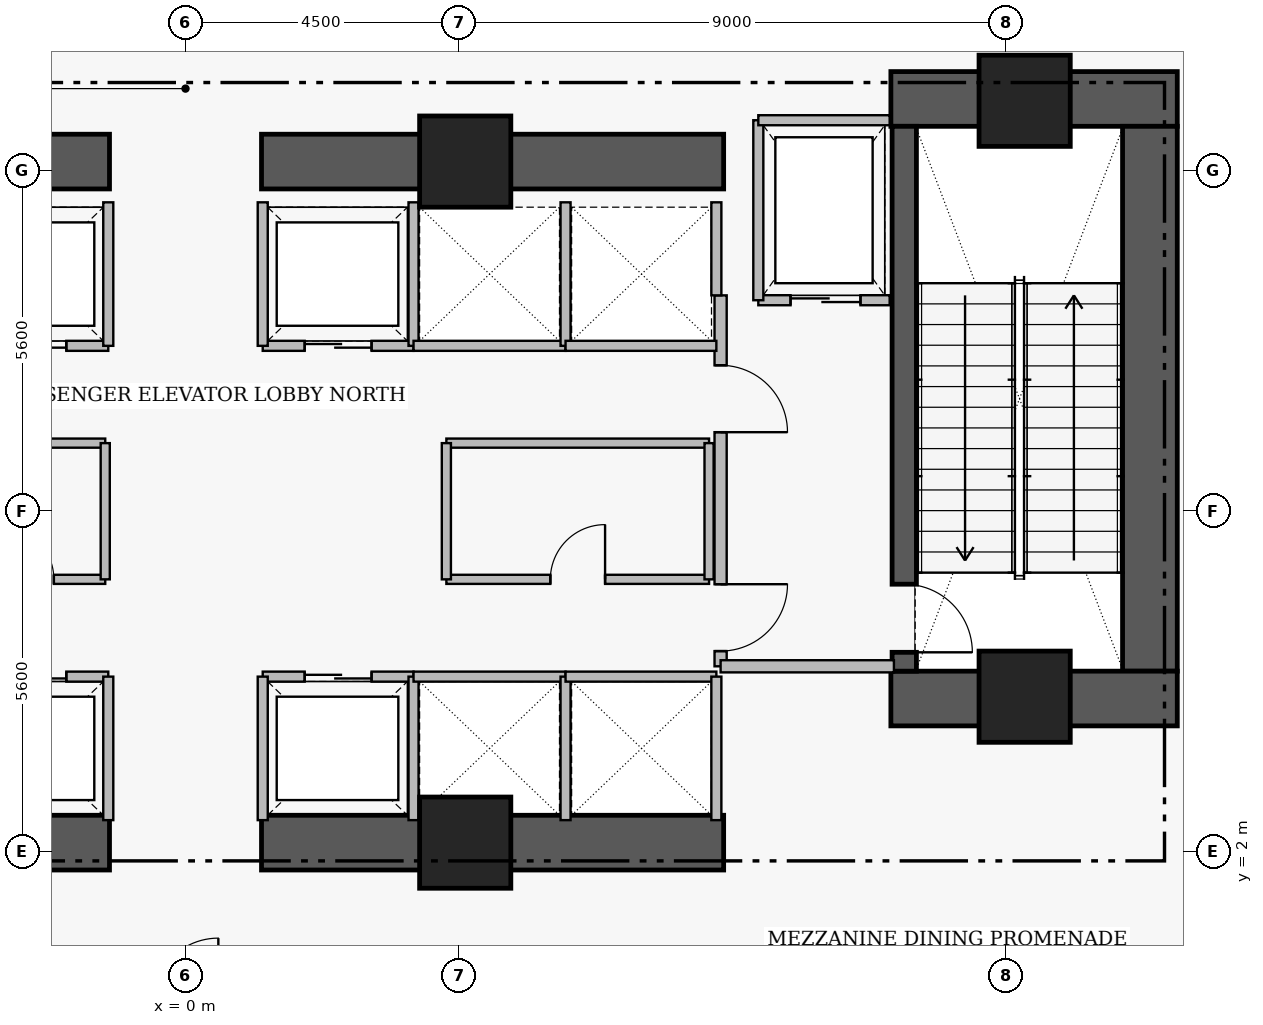
"""IFC4 building model, lengths in metres.
Left out: names, types, materials, properties, quantities, classifications, styles, units other than length and angle.
Written with IfcOpenShell. Run it as: python <this file> out.ifc"""

import sys

from ifc_helpers import new_model, si_unit, direction, frame, frame_2d, origin, origin_2d, place, context, subcontext, project, spatial, rectangle, extrude, element, fill, save


model = new_model("IFC4")
c1 = context("Model", 3, precision=1e-05, world=origin(), true_north=direction((0.0, 1.0)))
c2 = subcontext(c1, "Body", "Model", "MODEL_VIEW")
j1 = project(units=[si_unit("LENGTHUNIT", "METRE"), si_unit("PLANEANGLEUNIT", "RADIAN")], contexts=[c1])
p1 = place(None, origin())
s1 = spatial("IfcSite", under=j1, at=p1, CompositionType="ELEMENT")
p2 = place(p1, origin())
s2 = spatial("IfcBuilding", under=s1, at=p2, CompositionType="ELEMENT")
p3 = place(p2, frame((0.0, 0.0, 6.0)))
s3 = spatial("IfcBuildingStorey", under=s2, at=p3, CompositionType="ELEMENT", Elevation=6.0)
p4 = place(p3, frame((11.6, 14.38, 0.0), z_axis=(0.0, 0.0, 1.0), x_axis=(1.0, 0.0, 0.0)))
e1 = element("IfcWall", 1, at=p4, inside=s3, PredefinedType="SHEAR", context=c2, shape_type="SweptSolid", body=[
    extrude(rectangle(XDim=4.71, YDim=0.9, at=frame_2d((2.355, 0.0))), origin(), (0.0, 0.0, 1.0), 5.21),
])
p5 = place(p3, frame((15.86, 4.97, 0.0), z_axis=(0.0, 0.0, 1.0), x_axis=(0.0, 1.0, 0.0)))
e2 = element("IfcWall", 2, at=p5, inside=s3, PredefinedType="SHEAR", context=c2, shape_type="SweptSolid", body=[
    extrude(rectangle(XDim=8.96, YDim=0.9, at=frame_2d((4.48, 0.0))), origin(), (0.0, 0.0, 1.0), 5.21),
])
p6 = place(p3, frame((11.6, 4.52, 0.0), z_axis=(0.0, 0.0, 1.0), x_axis=(1.0, 0.0, 0.0)))
e3 = element("IfcWall", 3, at=p6, inside=s3, PredefinedType="SHEAR", context=c2, shape_type="SweptSolid", body=[
    extrude(rectangle(XDim=4.71, YDim=0.9, at=frame_2d((2.355, 0.0))), origin(), (0.0, 0.0, 1.0), 5.21),
])
for number, where, z_axis, x_axis in (
    (4, (-8.85, 2.15, 0.0), (0.0, 0.0, 1.0), (1.0, 0.0, 0.0)),
    (5, (1.25, 2.15, 0.0), (0.0, 0.0, 1.0), (1.0, 0.0, 0.0)),
    (6, (-8.85, 13.35, 0.0), (0.0, 0.0, 1.0), (1.0, 0.0, 0.0)),
    (7, (1.25, 13.35, 0.0), (0.0, 0.0, 1.0), (1.0, 0.0, 0.0)),
):
    element("IfcWall", number, at=place(p3, frame(where, z_axis=z_axis, x_axis=x_axis)), inside=s3, PredefinedType="SHEAR", context=c2, shape_type="SweptSolid", body=[
        extrude(rectangle(XDim=7.6, YDim=0.9, at=frame_2d((3.8, 0.0))), origin(), (0.0, 0.0, 1.0), 5.14),
    ])
p7 = place(p3, frame((11.82, 13.93, 0.0), z_axis=(0.0, 0.0, 1.0), x_axis=(0.0, -1.0, 0.0)))
e8 = element("IfcWall", 8, at=p7, inside=s3, PredefinedType="SHEAR", context=c2, shape_type="SweptSolid", body=[
    extrude(rectangle(XDim=8.96, YDim=0.4, at=frame_2d((4.48, 0.0))), origin(), (0.0, 0.0, 1.0), 5.21),
])
p8 = place(p7, frame((7.53, 0.0, 0.0)))
e9 = element("IfcOpeningElement", 9, at=p8, cuts=e8, PredefinedType="OPENING", context=c2, shape_type="SweptSolid", body=[
    extrude(rectangle(XDim=1.12, YDim=2.22, at=frame_2d((0.56, 1.11))), frame((0.0, 0.21, 0.0), z_axis=(0.0, -1.0, 0.0), x_axis=(1.0, 0.0, 0.0)), (0.0, 0.0, 1.0), 0.42),
])
for number, where, z_axis, x_axis in (
    (10, (4.6, 13.35, 0.0), (0.0, 0.0, 1.0), (1.0, 0.0, 0.0)),
    (11, (13.8, 14.35, 0.0), (0.0, 0.0, 1.0), (1.0, 0.0, 0.0)),
    (12, (4.6, 2.15, 0.0), (0.0, 0.0, 1.0), (1.0, 0.0, 0.0)),
    (13, (13.8, 4.55, 0.0), (0.0, 0.0, 1.0), (1.0, 0.0, 0.0)),
):
    element("IfcColumn", number, at=place(p3, frame(where, z_axis=z_axis, x_axis=x_axis)), inside=s3, PredefinedType="COLUMN", context=c2, shape_type="SweptSolid", body=[
        extrude(rectangle(XDim=1.5, YDim=1.5, at=origin_2d()), origin(), (0.0, 0.0, 1.0), 5.4),
    ])
p9 = place(p3, frame((8.8, 11.15, 0.0), z_axis=(0.0, 0.0, 1.0), x_axis=(0.0, -1.0, 0.0)))
e14 = element("IfcWall", 14, at=p9, inside=s3, PredefinedType="PARTITIONING", context=c2, shape_type="SweptSolid", body=[
    extrude(rectangle(XDim=6.1, YDim=0.2, at=frame_2d((3.05, 0.0))), origin(), (0.0, 0.0, 1.0), 5.14),
])
p10 = place(p9, frame((1.15, 0.0, 0.0)))
e15 = element("IfcOpeningElement", 15, at=p10, cuts=e14, PredefinedType="OPENING", context=c2, shape_type="SweptSolid", body=[
    extrude(rectangle(XDim=1.1, YDim=2.2, at=frame_2d((0.55, 1.1))), frame((0.0, 0.11, 0.0), z_axis=(0.0, -1.0, 0.0), x_axis=(1.0, 0.0, 0.0)), (0.0, 0.0, 1.0), 0.22),
])
p11 = place(p9, frame((4.75, 0.0, 0.0)))
e16 = element("IfcOpeningElement", 16, at=p11, cuts=e14, PredefinedType="OPENING", context=c2, shape_type="SweptSolid", body=[
    extrude(rectangle(XDim=1.1, YDim=2.2, at=frame_2d((0.55, 1.1))), frame((0.0, 0.11, 0.0), z_axis=(0.0, -1.0, 0.0), x_axis=(1.0, 0.0, 0.0)), (0.0, 0.0, 1.0), 0.22),
])
p12 = place(p3, frame((9.42, 11.07, 0.0), z_axis=(0.0, 0.0, 1.0), x_axis=(1.0, 0.0, 0.0)))
e17 = element("IfcWall", 17, at=p12, inside=s3, PredefinedType="PARTITIONING", context=c2, shape_type="SweptSolid", body=[
    extrude(rectangle(XDim=2.16, YDim=0.165, at=frame_2d((1.08, 0.0))), origin(), (0.0, 0.0, 1.0), 5.14),
])
p13 = place(p12, frame((0.53, 0.0, 0.0)))
e18 = element("IfcOpeningElement", 18, at=p13, cuts=e17, PredefinedType="OPENING", context=c2, shape_type="SweptSolid", body=[
    extrude(rectangle(XDim=1.15, YDim=2.25, at=frame_2d((0.575, 1.125))), frame((0.0, 0.093, 0.0), z_axis=(0.0, -1.0, 0.0), x_axis=(1.0, 0.0, 0.0)), (0.0, 0.0, 1.0), 0.185),
])
p14 = place(p3, frame((-3.75, 4.88, 0.0), z_axis=(0.0, 0.0, 1.0), x_axis=(1.0, 0.0, 0.0)))
e19 = element("IfcWall", 19, at=p14, inside=s3, PredefinedType="PARTITIONING", context=c2, shape_type="SweptSolid", body=[
    extrude(rectangle(XDim=2.48, YDim=0.165, at=frame_2d((1.24, 0.0))), origin(), (0.0, 0.0, 1.0), 5.14),
])
p15 = place(p14, frame((0.69, 0.0, 0.0)))
e20 = element("IfcOpeningElement", 20, at=p15, cuts=e19, PredefinedType="OPENING", context=c2, shape_type="SweptSolid", body=[
    extrude(rectangle(XDim=1.1, YDim=2.25, at=frame_2d((0.55, 1.125))), frame((0.0, 0.093, 0.0), z_axis=(0.0, -1.0, 0.0), x_axis=(1.0, 0.0, 0.0)), (0.0, 0.0, 1.0), 0.185),
])
p16 = place(p3, frame((1.27, 4.88, 0.0), z_axis=(0.0, 0.0, 1.0), x_axis=(1.0, 0.0, 0.0)))
e21 = element("IfcWall", 21, at=p16, inside=s3, PredefinedType="PARTITIONING", context=c2, shape_type="SweptSolid", body=[
    extrude(rectangle(XDim=2.48, YDim=0.165, at=frame_2d((1.24, 0.0))), origin(), (0.0, 0.0, 1.0), 5.14),
])
p17 = place(p16, frame((0.69, 0.0, 0.0)))
e22 = element("IfcOpeningElement", 22, at=p17, cuts=e21, PredefinedType="OPENING", context=c2, shape_type="SweptSolid", body=[
    extrude(rectangle(XDim=1.1, YDim=2.25, at=frame_2d((0.55, 1.125))), frame((0.0, 0.093, 0.0), z_axis=(0.0, -1.0, 0.0), x_axis=(1.0, 0.0, 0.0)), (0.0, 0.0, 1.0), 0.185),
])
p18 = place(p3, frame((-3.75, 10.32, 0.0), z_axis=(0.0, 0.0, 1.0), x_axis=(1.0, 0.0, 0.0)))
e23 = element("IfcWall", 23, at=p18, inside=s3, PredefinedType="PARTITIONING", context=c2, shape_type="SweptSolid", body=[
    extrude(rectangle(XDim=2.48, YDim=0.165, at=frame_2d((1.24, 0.0))), origin(), (0.0, 0.0, 1.0), 5.14),
])
p19 = place(p18, frame((0.69, 0.0, 0.0)))
e24 = element("IfcOpeningElement", 24, at=p19, cuts=e23, PredefinedType="OPENING", context=c2, shape_type="SweptSolid", body=[
    extrude(rectangle(XDim=1.1, YDim=2.25, at=frame_2d((0.55, 1.125))), frame((0.0, 0.093, 0.0), z_axis=(0.0, -1.0, 0.0), x_axis=(1.0, 0.0, 0.0)), (0.0, 0.0, 1.0), 0.185),
])
p20 = place(p3, frame((1.27, 10.32, 0.0), z_axis=(0.0, 0.0, 1.0), x_axis=(1.0, 0.0, 0.0)))
e25 = element("IfcWall", 25, at=p20, inside=s3, PredefinedType="PARTITIONING", context=c2, shape_type="SweptSolid", body=[
    extrude(rectangle(XDim=2.48, YDim=0.165, at=frame_2d((1.24, 0.0))), origin(), (0.0, 0.0, 1.0), 5.14),
])
p21 = place(p20, frame((0.69, 0.0, 0.0)))
e26 = element("IfcOpeningElement", 26, at=p21, cuts=e25, PredefinedType="OPENING", context=c2, shape_type="SweptSolid", body=[
    extrude(rectangle(XDim=1.1, YDim=2.25, at=frame_2d((0.55, 1.125))), frame((0.0, 0.093, 0.0), z_axis=(0.0, -1.0, 0.0), x_axis=(1.0, 0.0, 0.0)), (0.0, 0.0, 1.0), 0.185),
])
p22 = place(p3, frame((-3.91, 6.48, 0.0), z_axis=(0.0, 0.0, 1.0), x_axis=(1.0, 0.0, 0.0)))
e27 = element("IfcWall", 27, at=p22, inside=s3, PredefinedType="PARTITIONING", context=c2, shape_type="SweptSolid", body=[
    extrude(rectangle(XDim=2.59, YDim=0.15, at=frame_2d((1.295, 0.0))), origin(), (0.0, 0.0, 1.0), 5.14),
])
p23 = place(p22, frame((0.845, 0.0, 0.0)))
e28 = element("IfcOpeningElement", 28, at=p23, cuts=e27, PredefinedType="OPENING", context=c2, shape_type="SweptSolid", body=[
    extrude(rectangle(XDim=0.9, YDim=2.15, at=frame_2d((0.45, 1.075))), frame((0.0, 0.085, 0.0), z_axis=(0.0, -1.0, 0.0), x_axis=(1.0, 0.0, 0.0)), (0.0, 0.0, 1.0), 0.17),
])
p24 = place(p3, frame((4.29, 6.48, 0.0), z_axis=(0.0, 0.0, 1.0), x_axis=(1.0, 0.0, 0.0)))
e29 = element("IfcWall", 29, at=p24, inside=s3, PredefinedType="PARTITIONING", context=c2, shape_type="SweptSolid", body=[
    extrude(rectangle(XDim=4.32, YDim=0.15, at=frame_2d((2.16, 0.0))), origin(), (0.0, 0.0, 1.0), 5.14),
])
p25 = place(p24, frame((1.71, 0.0, 0.0)))
e30 = element("IfcOpeningElement", 30, at=p25, cuts=e29, PredefinedType="OPENING", context=c2, shape_type="SweptSolid", body=[
    extrude(rectangle(XDim=0.9, YDim=2.15, at=frame_2d((0.45, 1.075))), frame((0.0, 0.085, 0.0), z_axis=(0.0, -1.0, 0.0), x_axis=(1.0, 0.0, 0.0)), (0.0, 0.0, 1.0), 0.17),
])
p26 = place(p3, frame((8.8, 5.05, 0.0), z_axis=(0.0, 0.0, 1.0), x_axis=(1.0, 0.0, 0.0)))
e31 = element("IfcWall", 31, at=p26, inside=s3, PredefinedType="PARTITIONING", context=c2, shape_type="SweptSolid", body=[
    extrude(rectangle(XDim=2.85, YDim=0.2, at=frame_2d((1.425, 0.0))), origin(), (0.0, 0.0, 1.0), 5.14),
])
p27 = place(p3, frame((9.42, 11.07, 0.0), z_axis=(0.0, 0.0, 1.0), x_axis=(0.0, 1.0, 0.0)))
e32 = element("IfcWall", 32, at=p27, inside=s3, PredefinedType="PARTITIONING", context=c2, shape_type="SweptSolid", body=[
    extrude(rectangle(XDim=2.96, YDim=0.165, at=frame_2d((1.48, 0.0))), origin(), (0.0, 0.0, 1.0), 5.14),
])
p28 = place(p3, frame((9.42, 14.03, 0.0), z_axis=(0.0, 0.0, 1.0), x_axis=(1.0, 0.0, 0.0)))
e33 = element("IfcWall", 33, at=p28, inside=s3, PredefinedType="PARTITIONING", context=c2, shape_type="SweptSolid", body=[
    extrude(rectangle(XDim=2.16, YDim=0.165, at=frame_2d((1.08, 0.0))), origin(), (0.0, 0.0, 1.0), 5.14),
])
for number, where, z_axis, x_axis in (
    (34, (-1.27, 2.52, 0.0), (0.0, 0.0, 1.0), (0.0, 1.0, 0.0)),
    (35, (1.27, 2.52, 0.0), (0.0, 0.0, 1.0), (0.0, 1.0, 0.0)),
    (36, (3.75, 2.52, 0.0), (0.0, 0.0, 1.0), (0.0, 1.0, 0.0)),
    (37, (-1.27, 10.32, 0.0), (0.0, 0.0, 1.0), (0.0, 1.0, 0.0)),
    (38, (1.27, 10.32, 0.0), (0.0, 0.0, 1.0), (0.0, 1.0, 0.0)),
    (39, (3.75, 10.32, 0.0), (0.0, 0.0, 1.0), (0.0, 1.0, 0.0)),
):
    element("IfcWall", number, at=place(p3, frame(where, z_axis=z_axis, x_axis=x_axis)), inside=s3, PredefinedType="PARTITIONING", context=c2, shape_type="SweptSolid", body=[
        extrude(rectangle(XDim=2.36, YDim=0.165, at=frame_2d((1.18, 0.0))), origin(), (0.0, 0.0, 1.0), 5.14),
    ])
p29 = place(p3, frame((3.75, 4.88, 0.0), z_axis=(0.0, 0.0, 1.0), x_axis=(1.0, 0.0, 0.0)))
e40 = element("IfcWall", 40, at=p29, inside=s3, PredefinedType="PARTITIONING", context=c2, shape_type="SweptSolid", body=[
    extrude(rectangle(XDim=2.5, YDim=0.165, at=frame_2d((1.25, 0.0))), origin(), (0.0, 0.0, 1.0), 5.14),
])
p30 = place(p3, frame((6.25, 2.52, 0.0), z_axis=(0.0, 0.0, 1.0), x_axis=(0.0, 1.0, 0.0)))
e41 = element("IfcWall", 41, at=p30, inside=s3, PredefinedType="PARTITIONING", context=c2, shape_type="SweptSolid", body=[
    extrude(rectangle(XDim=2.36, YDim=0.165, at=frame_2d((1.18, 0.0))), origin(), (0.0, 0.0, 1.0), 5.14),
])
p31 = place(p3, frame((6.25, 4.88, 0.0), z_axis=(0.0, 0.0, 1.0), x_axis=(1.0, 0.0, 0.0)))
e42 = element("IfcWall", 42, at=p31, inside=s3, PredefinedType="PARTITIONING", context=c2, shape_type="SweptSolid", body=[
    extrude(rectangle(XDim=2.48, YDim=0.165, at=frame_2d((1.24, 0.0))), origin(), (0.0, 0.0, 1.0), 5.14),
])
p32 = place(p3, frame((8.73, 2.52, 0.0), z_axis=(0.0, 0.0, 1.0), x_axis=(0.0, 1.0, 0.0)))
e43 = element("IfcWall", 43, at=p32, inside=s3, PredefinedType="PARTITIONING", context=c2, shape_type="SweptSolid", body=[
    extrude(rectangle(XDim=2.36, YDim=0.165, at=frame_2d((1.18, 0.0))), origin(), (0.0, 0.0, 1.0), 5.14),
])
p33 = place(p3, frame((3.75, 10.32, 0.0), z_axis=(0.0, 0.0, 1.0), x_axis=(1.0, 0.0, 0.0)))
e44 = element("IfcWall", 44, at=p33, inside=s3, PredefinedType="PARTITIONING", context=c2, shape_type="SweptSolid", body=[
    extrude(rectangle(XDim=2.5, YDim=0.165, at=frame_2d((1.25, 0.0))), origin(), (0.0, 0.0, 1.0), 5.14),
])
p34 = place(p3, frame((6.25, 10.32, 0.0), z_axis=(0.0, 0.0, 1.0), x_axis=(0.0, 1.0, 0.0)))
e45 = element("IfcWall", 45, at=p34, inside=s3, PredefinedType="PARTITIONING", context=c2, shape_type="SweptSolid", body=[
    extrude(rectangle(XDim=2.36, YDim=0.165, at=frame_2d((1.18, 0.0))), origin(), (0.0, 0.0, 1.0), 5.14),
])
p35 = place(p3, frame((6.25, 10.32, 0.0), z_axis=(0.0, 0.0, 1.0), x_axis=(1.0, 0.0, 0.0)))
e46 = element("IfcWall", 46, at=p35, inside=s3, PredefinedType="PARTITIONING", context=c2, shape_type="SweptSolid", body=[
    extrude(rectangle(XDim=2.48, YDim=0.165, at=frame_2d((1.24, 0.0))), origin(), (0.0, 0.0, 1.0), 5.14),
])
p36 = place(p3, frame((8.73, 11.15, 0.0), z_axis=(0.0, 0.0, 1.0), x_axis=(0.0, 1.0, 0.0)))
e47 = element("IfcWall", 47, at=p36, inside=s3, PredefinedType="PARTITIONING", context=c2, shape_type="SweptSolid", body=[
    extrude(rectangle(XDim=1.53, YDim=0.165, at=frame_2d((0.765, 0.0))), origin(), (0.0, 0.0, 1.0), 5.14),
])
p37 = place(p3, frame((-3.91, 8.72, 0.0), z_axis=(0.0, 0.0, 1.0), x_axis=(1.0, 0.0, 0.0)))
e48 = element("IfcWall", 48, at=p37, inside=s3, PredefinedType="PARTITIONING", context=c2, shape_type="SweptSolid", body=[
    extrude(rectangle(XDim=2.59, YDim=0.15, at=frame_2d((1.295, 0.0))), origin(), (0.0, 0.0, 1.0), 5.14),
])
p38 = place(p3, frame((-1.32, 6.48, 0.0), z_axis=(0.0, 0.0, 1.0), x_axis=(0.0, 1.0, 0.0)))
e49 = element("IfcWall", 49, at=p38, inside=s3, PredefinedType="PARTITIONING", context=c2, shape_type="SweptSolid", body=[
    extrude(rectangle(XDim=2.24, YDim=0.15, at=frame_2d((1.12, 0.0))), origin(), (0.0, 0.0, 1.0), 5.14),
])
p39 = place(p3, frame((4.29, 8.72, 0.0), z_axis=(0.0, 0.0, 1.0), x_axis=(1.0, 0.0, 0.0)))
e50 = element("IfcWall", 50, at=p39, inside=s3, PredefinedType="PARTITIONING", context=c2, shape_type="SweptSolid", body=[
    extrude(rectangle(XDim=4.32, YDim=0.15, at=frame_2d((2.16, 0.0))), origin(), (0.0, 0.0, 1.0), 5.14),
])
for number, where, z_axis, x_axis in (
    (51, (4.29, 6.48, 0.0), (0.0, 0.0, 1.0), (0.0, 1.0, 0.0)),
    (52, (8.61, 6.48, 0.0), (0.0, 0.0, 1.0), (0.0, 1.0, 0.0)),
):
    element("IfcWall", number, at=place(p3, frame(where, z_axis=z_axis, x_axis=x_axis)), inside=s3, PredefinedType="PARTITIONING", context=c2, shape_type="SweptSolid", body=[
        extrude(rectangle(XDim=2.24, YDim=0.15, at=frame_2d((1.12, 0.0))), origin(), (0.0, 0.0, 1.0), 5.14),
    ])
p40 = place(p8, origin())
e53 = element("IfcDoor", 53, at=p40, inside=s3, OperationType="SINGLE_SWING_RIGHT", PredefinedType="DOOR", context=c2, shape_type="SweptSolid", body=[
    extrude(rectangle(XDim=1.12, YDim=2.22, at=frame_2d((0.56, 1.11))), frame((0.0, 0.025, 0.0), z_axis=(0.0, -1.0, 0.0), x_axis=(1.0, 0.0, 0.0)), (0.0, 0.0, 1.0), 0.05),
])
fill(e9, e53)
p41 = place(p10, origin())
e54 = element("IfcDoor", 54, at=p41, inside=s3, OperationType="SINGLE_SWING_RIGHT", PredefinedType="DOOR", context=c2, shape_type="SweptSolid", body=[
    extrude(rectangle(XDim=1.1, YDim=2.2, at=frame_2d((0.55, 1.1))), frame((0.0, 0.025, 0.0), z_axis=(0.0, -1.0, 0.0), x_axis=(1.0, 0.0, 0.0)), (0.0, 0.0, 1.0), 0.05),
])
fill(e15, e54)
p42 = place(p11, origin())
e55 = element("IfcDoor", 55, at=p42, inside=s3, OperationType="SINGLE_SWING_LEFT", PredefinedType="DOOR", context=c2, shape_type="SweptSolid", body=[
    extrude(rectangle(XDim=1.1, YDim=2.2, at=frame_2d((0.55, 1.1))), frame((0.0, 0.025, 0.0), z_axis=(0.0, -1.0, 0.0), x_axis=(1.0, 0.0, 0.0)), (0.0, 0.0, 1.0), 0.05),
])
fill(e16, e55)
p43 = place(p13, origin())
e56 = element("IfcDoor", 56, at=p43, inside=s3, OperationType="SLIDING_TO_LEFT", PredefinedType="DOOR", context=c2, shape_type="SweptSolid", body=[
    extrude(rectangle(XDim=1.15, YDim=2.25, at=frame_2d((0.575, 1.125))), frame((0.0, 0.025, 0.0), z_axis=(0.0, -1.0, 0.0), x_axis=(1.0, 0.0, 0.0)), (0.0, 0.0, 1.0), 0.05),
])
fill(e18, e56)
p44 = place(p15, origin())
e57 = element("IfcDoor", 57, at=p44, inside=s3, OperationType="SLIDING_TO_LEFT", PredefinedType="DOOR", context=c2, shape_type="SweptSolid", body=[
    extrude(rectangle(XDim=1.1, YDim=2.25, at=frame_2d((0.55, 1.125))), frame((0.0, 0.025, 0.0), z_axis=(0.0, -1.0, 0.0), x_axis=(1.0, 0.0, 0.0)), (0.0, 0.0, 1.0), 0.05),
])
fill(e20, e57)
p45 = place(p17, origin())
e58 = element("IfcDoor", 58, at=p45, inside=s3, OperationType="SLIDING_TO_LEFT", PredefinedType="DOOR", context=c2, shape_type="SweptSolid", body=[
    extrude(rectangle(XDim=1.1, YDim=2.25, at=frame_2d((0.55, 1.125))), frame((0.0, 0.025, 0.0), z_axis=(0.0, -1.0, 0.0), x_axis=(1.0, 0.0, 0.0)), (0.0, 0.0, 1.0), 0.05),
])
fill(e22, e58)
p46 = place(p19, origin())
e59 = element("IfcDoor", 59, at=p46, inside=s3, OperationType="SLIDING_TO_LEFT", PredefinedType="DOOR", context=c2, shape_type="SweptSolid", body=[
    extrude(rectangle(XDim=1.1, YDim=2.25, at=frame_2d((0.55, 1.125))), frame((0.0, 0.025, 0.0), z_axis=(0.0, -1.0, 0.0), x_axis=(1.0, 0.0, 0.0)), (0.0, 0.0, 1.0), 0.05),
])
fill(e24, e59)
p47 = place(p21, origin())
e60 = element("IfcDoor", 60, at=p47, inside=s3, OperationType="SLIDING_TO_LEFT", PredefinedType="DOOR", context=c2, shape_type="SweptSolid", body=[
    extrude(rectangle(XDim=1.1, YDim=2.25, at=frame_2d((0.55, 1.125))), frame((0.0, 0.025, 0.0), z_axis=(0.0, -1.0, 0.0), x_axis=(1.0, 0.0, 0.0)), (0.0, 0.0, 1.0), 0.05),
])
fill(e26, e60)
p48 = place(p23, origin())
e61 = element("IfcDoor", 61, at=p48, inside=s3, OperationType="SINGLE_SWING_LEFT", PredefinedType="DOOR", context=c2, shape_type="SweptSolid", body=[
    extrude(rectangle(XDim=0.9, YDim=2.15, at=frame_2d((0.45, 1.075))), frame((0.0, 0.025, 0.0), z_axis=(0.0, -1.0, 0.0), x_axis=(1.0, 0.0, 0.0)), (0.0, 0.0, 1.0), 0.05),
])
fill(e28, e61)
p49 = place(p25, origin())
e62 = element("IfcDoor", 62, at=p49, inside=s3, OperationType="SINGLE_SWING_RIGHT", PredefinedType="DOOR", context=c2, shape_type="SweptSolid", body=[
    extrude(rectangle(XDim=0.9, YDim=2.15, at=frame_2d((0.45, 1.075))), frame((0.0, 0.025, 0.0), z_axis=(0.0, -1.0, 0.0), x_axis=(1.0, 0.0, 0.0)), (0.0, 0.0, 1.0), 0.05),
])
fill(e30, e62)
save(model, sys.argv[1])
